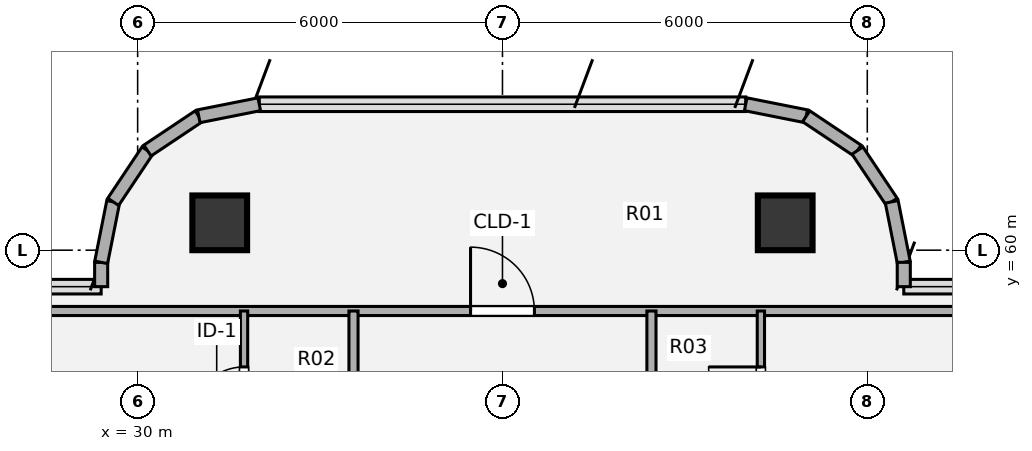
"""IFC4 building model, lengths in metres.
Left out: names, types, materials, properties, quantities, classifications, styles, units other than length and angle.
Written with IfcOpenShell. Run it as: python <this file> out.ifc"""

import sys

from ifc_helpers import new_model, si_unit, direction, frame, frame_2d, origin, origin_2d, place, context, subcontext, project, spatial, rectangle, hollow_circle, extrude, source, transform, mapped, element, fill, save


model = new_model("IFC4")
c1 = context("Model", 3, precision=1e-05, world=origin(), true_north=direction((0.0, 1.0)))
c2 = subcontext(c1, "Body", "Model", "MODEL_VIEW")
j1 = project(units=[si_unit("LENGTHUNIT", "METRE"), si_unit("PLANEANGLEUNIT", "RADIAN")], contexts=[c1])
p1 = place(None, origin())
s1 = spatial("IfcSite", under=j1, at=p1, CompositionType="ELEMENT")
p2 = place(p1, origin())
s2 = spatial("IfcBuilding", under=s1, at=p2, CompositionType="ELEMENT")
p3 = place(p2, frame((0.0, 0.0, 226.8)))
s3 = spatial("IfcBuildingStorey", under=s2, at=p3, CompositionType="ELEMENT", Elevation=226.8)
m1 = source(origin(), c2, "Body", "SweptSolid", [
    extrude(hollow_circle(Radius=0.45, WallThickness=0.032, at=origin_2d()), origin(), (0.0, 0.0, 1.0), 3.78),
])
for number, where, z_axis, x_axis in (
    (1, (31.35, 60.45, 0.0), (0.0, 0.0, 1.0), (1.0, 0.0, 0.0)),
    (2, (40.65, 60.45, 0.0), (0.0, 0.0, 1.0), (1.0, 0.0, 0.0)),
):
    element("IfcColumn", number, at=place(p3, frame(where, z_axis=z_axis, x_axis=x_axis)), inside=s3, PredefinedType="COLUMN", context=c2, shape_type="MappedRepresentation", body=[
        mapped(m1, transform((0.0, 0.0, 0.0), x_axis=(1.0, 0.0, 0.0), y_axis=(0.0, 1.0, 0.0), z_axis=(0.0, 0.0, 1.0), scale=1.0)),
    ])
p4 = place(p3, frame((29.4, 59.4, 0.0), z_axis=(0.0, 0.0, 1.0), x_axis=(0.0, 1.0, 0.0)))
e3 = element("IfcWall", 3, at=p4, inside=s3, PredefinedType="SOLIDWALL", context=c2, shape_type="SweptSolid", body=[
    extrude(rectangle(XDim=0.4, YDim=0.215, at=frame_2d((0.2, 0.0))), origin(), (0.0, 0.0, 1.0), 3.53),
])
p5 = place(p3, frame((29.4, 59.8, 0.0), z_axis=(0.0, 0.0, 1.0), x_axis=(0.195190360752, 0.980765376158, 0.0)))
e4 = element("IfcWall", 4, at=p5, inside=s3, PredefinedType="SOLIDWALL", context=c2, shape_type="SweptSolid", body=[
    extrude(rectangle(XDim=1.014, YDim=0.215, at=frame_2d((0.507, 0.0))), origin(), (0.0, 0.0, 1.0), 3.53),
])
p6 = place(p3, frame((29.598, 60.795, 0.0), z_axis=(0.0, 0.0, 1.0), x_axis=(0.555643898837, 0.831420385657, 0.0)))
e5 = element("IfcWall", 5, at=p6, inside=s3, PredefinedType="SOLIDWALL", context=c2, shape_type="SweptSolid", body=[
    extrude(rectangle(XDim=1.015, YDim=0.215, at=frame_2d((0.507, 0.0))), origin(), (0.0, 0.0, 1.0), 3.53),
])
p7 = place(p3, frame((30.162, 61.638, 0.0), z_axis=(0.0, 0.0, 1.0), x_axis=(0.831346067305, 0.555755086685, 0.0)))
e6 = element("IfcWall", 6, at=p7, inside=s3, PredefinedType="SOLIDWALL", context=c2, shape_type="SweptSolid", body=[
    extrude(rectangle(XDim=1.014, YDim=0.215, at=frame_2d((0.507, 0.0))), origin(), (0.0, 0.0, 1.0), 3.53),
])
for number, where, z_axis, x_axis in (
    (7, (31.005, 62.202, 0.0), (0.0, 0.0, 1.0), (0.981, 0.195, 0.0)),
    (8, (40.0, 62.4, 0.0), (0.0, 0.0, 1.0), (0.981, -0.195, 0.0)),
):
    element("IfcWall", number, at=place(p3, frame(where, z_axis=z_axis, x_axis=x_axis)), inside=s3, PredefinedType="SOLIDWALL", context=c2, shape_type="SweptSolid", body=[
        extrude(rectangle(XDim=1.015, YDim=0.215, at=frame_2d((0.507, 0.0))), origin(), (0.0, 0.0, 1.0), 3.53),
    ])
p8 = place(p3, frame((40.995, 62.202, 0.0), z_axis=(0.0, 0.0, 1.0), x_axis=(0.831346067305, -0.555755086685, 0.0)))
e9 = element("IfcWall", 9, at=p8, inside=s3, PredefinedType="SOLIDWALL", context=c2, shape_type="SweptSolid", body=[
    extrude(rectangle(XDim=1.014, YDim=0.215, at=frame_2d((0.507, 0.0))), origin(), (0.0, 0.0, 1.0), 3.53),
])
p9 = place(p3, frame((41.838, 61.638, 0.0), z_axis=(0.0, 0.0, 1.0), x_axis=(0.555643898837, -0.831420385657, 0.0)))
e10 = element("IfcWall", 10, at=p9, inside=s3, PredefinedType="SOLIDWALL", context=c2, shape_type="SweptSolid", body=[
    extrude(rectangle(XDim=1.015, YDim=0.215, at=frame_2d((0.507, 0.0))), origin(), (0.0, 0.0, 1.0), 3.53),
])
p10 = place(p3, frame((42.402, 60.795, 0.0), z_axis=(0.0, 0.0, 1.0), x_axis=(0.195190360752, -0.980765376158, 0.0)))
e11 = element("IfcWall", 11, at=p10, inside=s3, PredefinedType="SOLIDWALL", context=c2, shape_type="SweptSolid", body=[
    extrude(rectangle(XDim=1.014, YDim=0.215, at=frame_2d((0.507, 0.0))), origin(), (0.0, 0.0, 1.0), 3.53),
])
p11 = place(p3, frame((42.6, 59.8, 0.0), z_axis=(0.0, 0.0, 1.0), x_axis=(0.0, -1.0, 0.0)))
e12 = element("IfcWall", 12, at=p11, inside=s3, PredefinedType="SOLIDWALL", context=c2, shape_type="SweptSolid", body=[
    extrude(rectangle(XDim=0.4, YDim=0.215, at=frame_2d((0.2, 0.0))), origin(), (0.0, 0.0, 1.0), 3.53),
])
p12 = place(p3, frame((27.1, 59.0, 0.0), z_axis=(0.0, 0.0, 1.0), x_axis=(1.0, 0.0, 0.0)))
e13 = element("IfcWall", 13, at=p12, inside=s3, PredefinedType="PARTITIONING", context=c2, shape_type="SweptSolid", body=[
    extrude(rectangle(XDim=17.8, YDim=0.15, at=frame_2d((8.9, 0.0))), origin(), (0.0, 0.0, 1.0), 3.308),
])
p13 = place(p12, frame((8.375, 0.0, 0.0)))
e14 = element("IfcOpeningElement", 14, at=p13, cuts=e13, PredefinedType="OPENING", context=c2, shape_type="SweptSolid", body=[
    extrude(rectangle(XDim=1.05, YDim=2.1, at=origin_2d()), frame((0.525, 0.085, 1.05), z_axis=(0.0, -1.0, 0.0), x_axis=(1.0, 0.0, 0.0)), (0.0, 0.0, 1.0), 0.17),
])
p14 = place(p3, frame((31.75, 56.6, 0.0), z_axis=(0.0, 0.0, 1.0), x_axis=(0.0, 1.0, 0.0)))
e15 = element("IfcWall", 15, at=p14, inside=s3, PredefinedType="PARTITIONING", context=c2, shape_type="SweptSolid", body=[
    extrude(rectangle(XDim=2.4, YDim=0.12, at=frame_2d((1.2, 0.0))), origin(), (0.0, 0.0, 1.0), 3.5),
])
p15 = place(p14, frame((0.62, 0.0, 0.0)))
e16 = element("IfcOpeningElement", 16, at=p15, cuts=e15, PredefinedType="OPENING", context=c2, shape_type="SweptSolid", body=[
    extrude(rectangle(XDim=0.86, YDim=2.1, at=origin_2d()), frame((0.43, 0.07, 1.05), z_axis=(0.0, -1.0, 0.0), x_axis=(1.0, 0.0, 0.0)), (0.0, 0.0, 1.0), 0.14),
])
for number, where, z_axis, x_axis in (
    (17, (33.55, 56.6, 0.0), (0.0, 0.0, 1.0), (0.0, 1.0, 0.0)),
    (18, (38.45, 56.6, 0.0), (0.0, 0.0, 1.0), (0.0, 1.0, 0.0)),
):
    element("IfcWall", number, at=place(p3, frame(where, z_axis=z_axis, x_axis=x_axis)), inside=s3, PredefinedType="PARTITIONING", context=c2, shape_type="SweptSolid", body=[
        extrude(rectangle(XDim=2.4, YDim=0.15, at=frame_2d((1.2, 0.0))), origin(), (0.0, 0.0, 1.0), 3.5),
    ])
p16 = place(p3, frame((40.25, 56.6, 0.0), z_axis=(0.0, 0.0, 1.0), x_axis=(0.0, 1.0, 0.0)))
e19 = element("IfcWall", 19, at=p16, inside=s3, PredefinedType="PARTITIONING", context=c2, shape_type="SweptSolid", body=[
    extrude(rectangle(XDim=2.4, YDim=0.12, at=frame_2d((1.2, 0.0))), origin(), (0.0, 0.0, 1.0), 3.5),
])
p17 = place(p16, frame((0.62, 0.0, 0.0)))
e20 = element("IfcOpeningElement", 20, at=p17, cuts=e19, PredefinedType="OPENING", context=c2, shape_type="SweptSolid", body=[
    extrude(rectangle(XDim=0.86, YDim=2.1, at=origin_2d()), frame((0.43, 0.07, 1.05), z_axis=(0.0, -1.0, 0.0), x_axis=(1.0, 0.0, 0.0)), (0.0, 0.0, 1.0), 0.14),
])
m2 = source(origin(), c2, "Body", "SweptSolid", [
    extrude(rectangle(XDim=1.05, YDim=2.1, at=origin_2d()), frame((0.525, 0.025, 1.05), z_axis=(0.0, -1.0, 0.0), x_axis=(1.0, 0.0, 0.0)), (0.0, 0.0, 1.0), 0.05),
])
p18 = place(p13, origin())
e21 = element("IfcDoor", 21, at=p18, inside=s3, OperationType="SINGLE_SWING_LEFT", PredefinedType="DOOR", context=c2, shape_type="MappedRepresentation", body=[
    mapped(m2, transform((0.0, 0.0, 0.0), x_axis=(1.0, 0.0, 0.0), y_axis=(0.0, 1.0, 0.0), z_axis=(0.0, 0.0, 1.0), scale=1.0)),
])
fill(e14, e21)
m3 = source(origin(), c2, "Body", "SweptSolid", [
    extrude(rectangle(XDim=0.86, YDim=2.1, at=origin_2d()), frame((0.43, 0.025, 1.05), z_axis=(0.0, -1.0, 0.0), x_axis=(1.0, 0.0, 0.0)), (0.0, 0.0, 1.0), 0.05),
])
p19 = place(p15, origin())
e22 = element("IfcDoor", 22, at=p19, inside=s3, OperationType="SINGLE_SWING_LEFT", PredefinedType="DOOR", context=c2, shape_type="MappedRepresentation", body=[
    mapped(m3, transform((0.0, 0.0, 0.0), x_axis=(1.0, 0.0, 0.0), y_axis=(0.0, 1.0, 0.0), z_axis=(0.0, 0.0, 1.0), scale=1.0)),
])
fill(e16, e22)
p20 = place(p17, origin())
e23 = element("IfcDoor", 23, at=p20, inside=s3, OperationType="SINGLE_SWING_RIGHT", PredefinedType="DOOR", context=c2, shape_type="MappedRepresentation", body=[
    mapped(m3, transform((0.0, 0.0, 0.0), x_axis=(1.0, 0.0, 0.0), y_axis=(0.0, 1.0, 0.0), z_axis=(0.0, 0.0, 1.0), scale=1.0)),
])
fill(e20, e23)
save(model, sys.argv[1])
